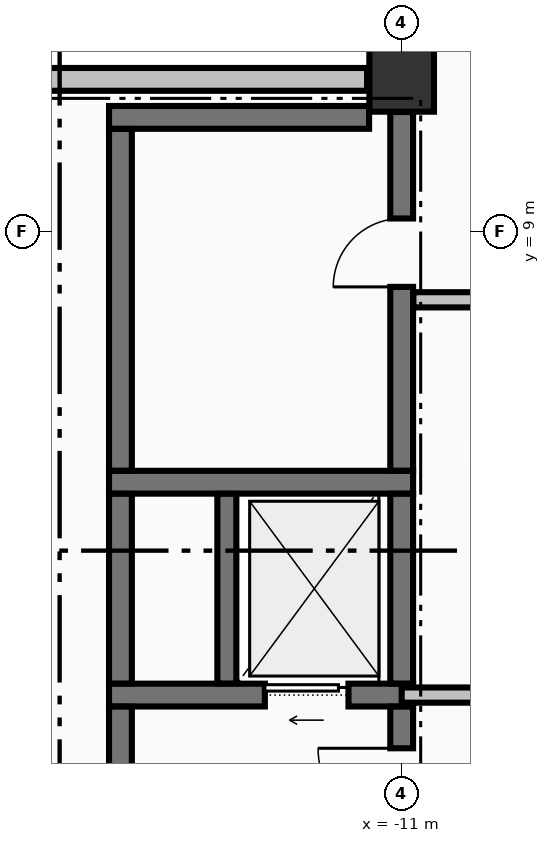
"""IFC4 building model, lengths in metres.
Left out: names, types, materials, properties, quantities, classifications, styles, units other than length and angle.
Written with IfcOpenShell. Run it as: python <this file> out.ifc"""

import sys

from ifc_helpers import new_model, si_unit, direction, frame, frame_2d, origin, origin_2d, place, context, subcontext, project, spatial, rectangle, extrude, element, fill, save


model = new_model("IFC4")
c1 = context("Model", 3, precision=1e-05, world=origin(), true_north=direction((0.0, 1.0)))
c2 = subcontext(c1, "Body", "Model", "MODEL_VIEW")
j1 = project(units=[si_unit("LENGTHUNIT", "METRE"), si_unit("PLANEANGLEUNIT", "RADIAN")], contexts=[c1])
p1 = place(None, origin())
s1 = spatial("IfcSite", under=j1, at=p1, CompositionType="ELEMENT")
p2 = place(p1, origin())
s2 = spatial("IfcBuilding", under=s1, at=p2, CompositionType="ELEMENT")
p3 = place(p2, frame((0.0, 0.0, 281.8)))
s3 = spatial("IfcBuildingStorey", under=s2, at=p3, CompositionType="ELEMENT", Elevation=281.8)
p4 = place(p3, frame((-11.0, 11.0, -0.325), z_axis=(0.0, 0.0, 1.0), x_axis=(1.0, 0.0, 0.0)))
e1 = element("IfcColumn", 1, at=p4, inside=s3, PredefinedType="COLUMN", context=c2, shape_type="SweptSolid", body=[
    extrude(rectangle(XDim=0.85, YDim=0.85, at=origin_2d()), origin(), (0.0, 0.0, 1.0), 3.06),
])
p5 = place(p3, frame((-11.455, 11.0, 0.0), z_axis=(0.0, 0.0, 1.0), x_axis=(-1.0, 0.0, 0.0)))
e2 = element("IfcWall", 2, at=p5, inside=s3, PredefinedType="STANDARD", context=c2, shape_type="SweptSolid", body=[
    extrude(rectangle(XDim=8.09, YDim=0.3, at=frame_2d((4.045, 0.0))), origin(), (0.0, 0.0, 1.0), 1.077),
])
p6 = place(p3, frame((-14.85, 2.9, 0.0), z_axis=(0.0, 0.0, 1.0), x_axis=(1.0, 0.0, 0.0)))
e3 = element("IfcWall", 3, at=p6, inside=s3, PredefinedType="SHEAR", context=c2, shape_type="SweptSolid", body=[
    extrude(rectangle(XDim=4.0, YDim=0.3, at=frame_2d((2.0, 0.0))), origin(), (0.0, 0.0, 1.0), 2.735),
])
p7 = place(p6, frame((2.05, 0.0, 0.0)))
e4 = element("IfcOpeningElement", 4, at=p7, cuts=e3, PredefinedType="OPENING", context=c2, shape_type="SweptSolid", body=[
    extrude(rectangle(XDim=1.1, YDim=2.2, at=frame_2d((0.55, 1.1))), frame((0.0, 0.16, 0.0), z_axis=(0.0, -1.0, 0.0), x_axis=(1.0, 0.0, 0.0)), (0.0, 0.0, 1.0), 0.32),
])
p8 = place(p3, frame((-14.85, 5.7, 0.0), z_axis=(0.0, 0.0, 1.0), x_axis=(1.0, 0.0, 0.0)))
e5 = element("IfcWall", 5, at=p8, inside=s3, PredefinedType="SHEAR", context=c2, shape_type="SweptSolid", body=[
    extrude(rectangle(XDim=4.0, YDim=0.3, at=frame_2d((2.0, 0.0))), origin(), (0.0, 0.0, 1.0), 2.735),
])
p9 = place(p3, frame((-14.85, 10.5, 0.0), z_axis=(0.0, 0.0, 1.0), x_axis=(1.0, 0.0, 0.0)))
e6 = element("IfcWall", 6, at=p9, inside=s3, PredefinedType="SHEAR", context=c2, shape_type="SweptSolid", body=[
    extrude(rectangle(XDim=3.421, YDim=0.3, at=frame_2d((1.71, 0.0))), origin(), (0.0, 0.0, 1.0), 2.735),
])
p10 = place(p3, frame((-11.0, 2.9, 0.0), z_axis=(0.0, 0.0, 1.0), x_axis=(1.0, 0.0, 0.0)))
e7 = element("IfcWall", 7, at=p10, inside=s3, PredefinedType="PARTITIONING", context=c2, shape_type="SweptSolid", body=[
    extrude(rectangle(XDim=22.0, YDim=0.2, at=frame_2d((11.0, 0.0))), origin(), (0.0, 0.0, 1.0), 2.735),
])
p11 = place(p10, frame((7.95, 0.0, 0.0)))
e8 = element("IfcOpeningElement", 8, at=p11, cuts=e7, PredefinedType="OPENING", context=c2, shape_type="SweptSolid", body=[
    extrude(rectangle(XDim=1.1, YDim=2.15, at=frame_2d((0.55, 1.075))), frame((0.0, 0.11, 0.0), z_axis=(0.0, -1.0, 0.0), x_axis=(1.0, 0.0, 0.0)), (0.0, 0.0, 1.0), 0.22),
])
p12 = place(p10, frame((17.475, 0.0, 0.0)))
e9 = element("IfcOpeningElement", 9, at=p12, cuts=e7, PredefinedType="OPENING", context=c2, shape_type="SweptSolid", body=[
    extrude(rectangle(XDim=1.05, YDim=2.15, at=frame_2d((0.525, 1.075))), frame((0.0, 0.11, 0.0), z_axis=(0.0, -1.0, 0.0), x_axis=(1.0, 0.0, 0.0)), (0.0, 0.0, 1.0), 0.22),
])
p13 = place(p10, frame((3.475, 0.0, 0.0)))
e10 = element("IfcOpeningElement", 10, at=p13, cuts=e7, PredefinedType="OPENING", context=c2, shape_type="SweptSolid", body=[
    extrude(rectangle(XDim=1.05, YDim=2.15, at=frame_2d((0.525, 1.075))), frame((0.0, 0.11, 0.0), z_axis=(0.0, -1.0, 0.0), x_axis=(1.0, 0.0, 0.0)), (0.0, 0.0, 1.0), 0.22),
])
p14 = place(p3, frame((-10.847, 8.1, 0.0), z_axis=(0.0, 0.0, 1.0), x_axis=(1.0, 0.0, 0.0)))
e11 = element("IfcWall", 11, at=p14, inside=s3, PredefinedType="PARTITIONING", context=c2, shape_type="SweptSolid", body=[
    extrude(rectangle(XDim=6.497, YDim=0.2, at=frame_2d((3.249, 0.0))), origin(), (0.0, 0.0, 1.0), 2.735),
])
p15 = place(p3, frame((-14.7, -0.098, 0.0), z_axis=(0.0, 0.0, 1.0), x_axis=(0.0, 1.0, 0.0)))
e12 = element("IfcWall", 12, at=p15, inside=s3, PredefinedType="SHEAR", context=c2, shape_type="SweptSolid", body=[
    extrude(rectangle(XDim=2.846, YDim=0.3, at=frame_2d((1.423, 0.0))), origin(), (0.0, 0.0, 1.0), 2.735),
])
p16 = place(p3, frame((-14.7, 3.052, 0.0), z_axis=(0.0, 0.0, 1.0), x_axis=(0.0, 1.0, 0.0)))
e13 = element("IfcWall", 13, at=p16, inside=s3, PredefinedType="SHEAR", context=c2, shape_type="SweptSolid", body=[
    extrude(rectangle(XDim=2.496, YDim=0.3, at=frame_2d((1.248, 0.0))), origin(), (0.0, 0.0, 1.0), 2.735),
])
p17 = place(p3, frame((-14.7, 5.852, 0.0), z_axis=(0.0, 0.0, 1.0), x_axis=(0.0, 1.0, 0.0)))
e14 = element("IfcWall", 14, at=p17, inside=s3, PredefinedType="SHEAR", context=c2, shape_type="SweptSolid", body=[
    extrude(rectangle(XDim=4.496, YDim=0.3, at=frame_2d((2.248, 0.0))), origin(), (0.0, 0.0, 1.0), 2.735),
])
p18 = place(p3, frame((-13.3, 3.052, 0.0), z_axis=(0.0, 0.0, 1.0), x_axis=(0.0, 1.0, 0.0)))
e15 = element("IfcWall", 15, at=p18, inside=s3, PredefinedType="SOLIDWALL", context=c2, shape_type="SweptSolid", body=[
    extrude(rectangle(XDim=2.496, YDim=0.25, at=frame_2d((1.248, 0.0))), origin(), (0.0, 0.0, 1.0), 2.735),
])
p19 = place(p3, frame((-11.0, 0.429, 0.0), z_axis=(0.0, 0.0, 1.0), x_axis=(0.0, 1.0, 0.0)))
e16 = element("IfcWall", 16, at=p19, inside=s3, PredefinedType="SHEAR", context=c2, shape_type="SweptSolid", body=[
    extrude(rectangle(XDim=2.319, YDim=0.3, at=frame_2d((1.16, 0.0))), origin(), (0.0, 0.0, 1.0), 2.735),
])
p20 = place(p19, frame((0.671, 0.0, 0.0)))
e17 = element("IfcOpeningElement", 17, at=p20, cuts=e16, PredefinedType="OPENING", context=c2, shape_type="SweptSolid", body=[
    extrude(rectangle(XDim=1.1, YDim=2.15, at=frame_2d((0.55, 1.075))), frame((0.0, 0.16, 0.0), z_axis=(0.0, -1.0, 0.0), x_axis=(1.0, 0.0, 0.0)), (0.0, 0.0, 1.0), 0.32),
])
p21 = place(p3, frame((-11.0, 3.052, 0.0), z_axis=(0.0, 0.0, 1.0), x_axis=(0.0, 1.0, 0.0)))
e18 = element("IfcWall", 18, at=p21, inside=s3, PredefinedType="SHEAR", context=c2, shape_type="SweptSolid", body=[
    extrude(rectangle(XDim=2.496, YDim=0.3, at=frame_2d((1.248, 0.0))), origin(), (0.0, 0.0, 1.0), 2.735),
])
p22 = place(p3, frame((-11.0, 5.852, 0.0), z_axis=(0.0, 0.0, 1.0), x_axis=(0.0, 1.0, 0.0)))
e19 = element("IfcWall", 19, at=p22, inside=s3, PredefinedType="SHEAR", context=c2, shape_type="SweptSolid", body=[
    extrude(rectangle(XDim=4.719, YDim=0.3, at=frame_2d((2.359, 0.0))), origin(), (0.0, 0.0, 1.0), 2.735),
])
p23 = place(p22, frame((2.418, 0.0, 0.0)))
e20 = element("IfcOpeningElement", 20, at=p23, cuts=e19, PredefinedType="OPENING", context=c2, shape_type="SweptSolid", body=[
    extrude(rectangle(XDim=0.9, YDim=2.15, at=frame_2d((0.45, 1.075))), frame((0.0, 0.16, 0.0), z_axis=(0.0, -1.0, 0.0), x_axis=(1.0, 0.0, 0.0)), (0.0, 0.0, 1.0), 0.32),
])
p24 = place(p20, origin())
e21 = element("IfcDoor", 21, at=p24, inside=s3, OperationType="SINGLE_SWING_RIGHT", PredefinedType="DOOR", context=c2, shape_type="SweptSolid", body=[
    extrude(rectangle(XDim=1.1, YDim=2.15, at=frame_2d((0.55, 1.075))), frame((0.0, 0.025, 0.0), z_axis=(0.0, -1.0, 0.0), x_axis=(1.0, 0.0, 0.0)), (0.0, 0.0, 1.0), 0.05),
])
fill(e17, e21)
p25 = place(p7, origin())
e22 = element("IfcDoor", 22, at=p25, inside=s3, OperationType="SLIDING_TO_LEFT", PredefinedType="DOOR", context=c2, shape_type="SweptSolid", body=[
    extrude(rectangle(XDim=1.1, YDim=2.2, at=frame_2d((0.55, 1.1))), frame((0.0, 0.025, 0.0), z_axis=(0.0, -1.0, 0.0), x_axis=(1.0, 0.0, 0.0)), (0.0, 0.0, 1.0), 0.05),
])
fill(e4, e22)
p26 = place(p23, origin())
e23 = element("IfcDoor", 23, at=p26, inside=s3, OperationType="SINGLE_SWING_LEFT", PredefinedType="DOOR", context=c2, shape_type="SweptSolid", body=[
    extrude(rectangle(XDim=0.9, YDim=2.15, at=frame_2d((0.45, 1.075))), frame((0.0, 0.025, 0.0), z_axis=(0.0, -1.0, 0.0), x_axis=(1.0, 0.0, 0.0)), (0.0, 0.0, 1.0), 0.05),
])
fill(e20, e23)
save(model, sys.argv[1])
